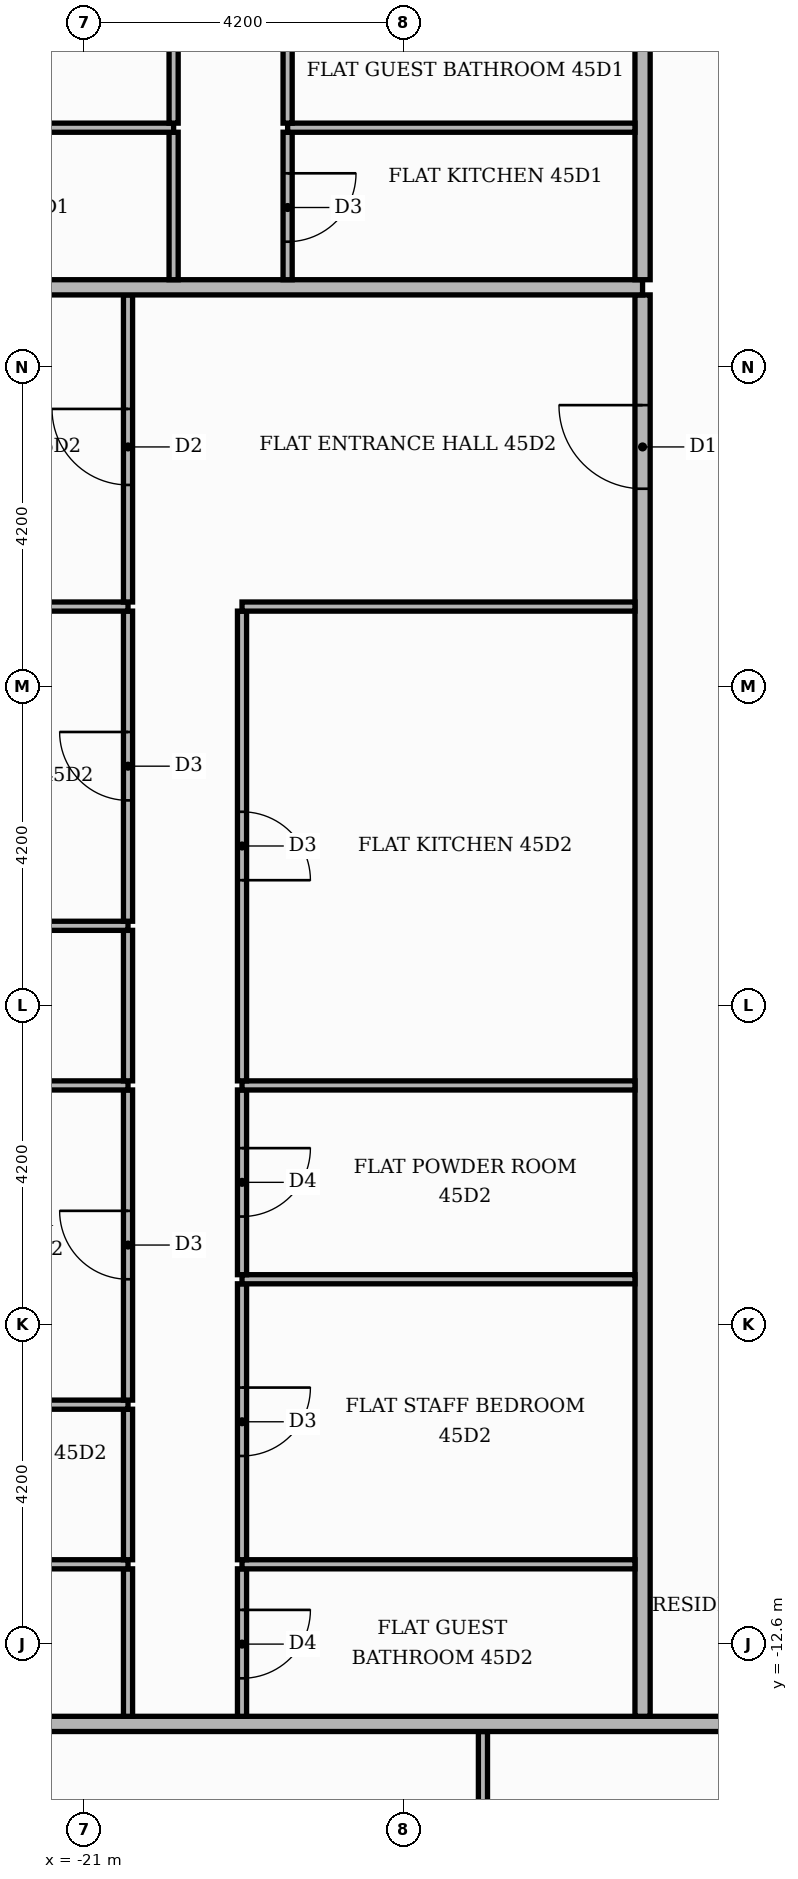
"""IFC4 building model, lengths in metres.
Left out: names, types, materials, properties, quantities, classifications, styles, units other than length and angle.
Written with IfcOpenShell. Run it as: python <this file> out.ifc"""

import sys

from ifc_helpers import new_model, si_unit, direction, frame, frame_2d, origin, place, context, subcontext, project, spatial, rectangle, extrude, element, fill, save


model = new_model("IFC4")
c1 = context("Model", 3, precision=1e-05, world=origin(), true_north=direction((0.0, 1.0)))
c2 = subcontext(c1, "Body", "Model", "MODEL_VIEW")
j1 = project(units=[si_unit("LENGTHUNIT", "METRE"), si_unit("PLANEANGLEUNIT", "RADIAN")], contexts=[c1])
p1 = place(None, origin())
s1 = spatial("IfcSite", under=j1, at=p1, CompositionType="ELEMENT")
p2 = place(p1, origin())
s2 = spatial("IfcBuilding", under=s1, at=p2, CompositionType="ELEMENT")
p3 = place(p2, frame((0.0, 0.0, 192.3)))
s3 = spatial("IfcBuildingStorey", under=s2, at=p3, CompositionType="ELEMENT", Elevation=192.3)
p4 = place(p3, frame((-15.75, -20.36, 0.0), z_axis=(0.0, 0.0, 1.0), x_axis=(0.0, 1.0, 0.0)))
e1 = element("IfcWall", 1, at=p4, inside=s3, PredefinedType="PARTITIONING", context=c2, shape_type="SweptSolid", body=[
    extrude(rectangle(XDim=6.61, YDim=0.12, at=frame_2d((3.305, 0.0))), origin(), (0.0, 0.0, 1.0), 3.48),
])
p5 = place(p4, frame((2.825, 0.0, 0.0)))
e2 = element("IfcOpeningElement", 2, at=p5, cuts=e1, PredefinedType="OPENING", context=c2, shape_type="SweptSolid", body=[
    extrude(rectangle(XDim=1.0, YDim=2.1, at=frame_2d((0.5, 1.05))), frame((0.0, 0.07, 0.0), z_axis=(0.0, -1.0, 0.0), x_axis=(1.0, 0.0, 0.0)), (0.0, 0.0, 1.0), 0.14),
])
p6 = place(p3, frame((-25.42, -13.65, 0.0), z_axis=(0.0, 0.0, 1.0), x_axis=(1.0, 0.0, 0.0)))
e3 = element("IfcWall", 3, at=p6, inside=s3, PredefinedType="PARTITIONING", context=c2, shape_type="SweptSolid", body=[
    extrude(rectangle(XDim=39.07, YDim=0.2, at=frame_2d((19.535, 0.0))), origin(), (0.0, 0.0, 1.0), 3.48),
])
p7 = place(p6, frame((13.32, 0.0, 0.0)))
e4 = element("IfcOpeningElement", 4, at=p7, cuts=e3, PredefinedType="OPENING", context=c2, shape_type="SweptSolid", body=[
    extrude(rectangle(XDim=1.1, YDim=2.4, at=frame_2d((0.55, 1.2))), frame((0.0, 0.11, 0.0), z_axis=(0.0, -1.0, 0.0), x_axis=(1.0, 0.0, 0.0)), (0.0, 0.0, 1.0), 0.22),
])
p8 = place(p6, frame((25.92, 0.0, 0.0)))
e5 = element("IfcOpeningElement", 5, at=p8, cuts=e3, PredefinedType="OPENING", context=c2, shape_type="SweptSolid", body=[
    extrude(rectangle(XDim=1.1, YDim=2.4, at=frame_2d((0.55, 1.2))), frame((0.0, 0.11, 0.0), z_axis=(0.0, -1.0, 0.0), x_axis=(1.0, 0.0, 0.0)), (0.0, 0.0, 1.0), 0.22),
])
p9 = place(p3, frame((-20.42, -13.55, 0.0), z_axis=(0.0, 0.0, 1.0), x_axis=(0.0, 1.0, 0.0)))
e6 = element("IfcWall", 6, at=p9, inside=s3, PredefinedType="PARTITIONING", context=c2, shape_type="SweptSolid", body=[
    extrude(rectangle(XDim=1.94, YDim=0.12, at=frame_2d((0.97, 0.0))), origin(), (0.0, 0.0, 1.0), 3.48),
])
p10 = place(p3, frame((-18.92, -13.55, 0.0), z_axis=(0.0, 0.0, 1.0), x_axis=(0.0, 1.0, 0.0)))
e7 = element("IfcWall", 7, at=p10, inside=s3, PredefinedType="PARTITIONING", context=c2, shape_type="SweptSolid", body=[
    extrude(rectangle(XDim=1.94, YDim=0.12, at=frame_2d((0.97, 0.0))), origin(), (0.0, 0.0, 1.0), 3.48),
])
p11 = place(p10, frame((0.5, 0.0, 0.0)))
e8 = element("IfcOpeningElement", 8, at=p11, cuts=e7, PredefinedType="OPENING", context=c2, shape_type="SweptSolid", body=[
    extrude(rectangle(XDim=0.9, YDim=2.1, at=frame_2d((0.45, 1.05))), frame((0.0, 0.07, 0.0), z_axis=(0.0, -1.0, 0.0), x_axis=(1.0, 0.0, 0.0)), (0.0, 0.0, 1.0), 0.14),
])
p12 = place(p3, frame((-13.65, -13.55, 0.0), z_axis=(0.0, 0.0, 1.0), x_axis=(0.0, 1.0, 0.0)))
e9 = element("IfcWall", 9, at=p12, inside=s3, PredefinedType="PARTITIONING", context=c2, shape_type="SweptSolid", body=[
    extrude(rectangle(XDim=18.7, YDim=0.2, at=frame_2d((9.35, 0.0))), origin(), (0.0, 0.0, 1.0), 3.48),
])
p13 = place(p12, frame((16.15, 0.0, 0.0)))
e10 = element("IfcOpeningElement", 10, at=p13, cuts=e9, PredefinedType="OPENING", context=c2, shape_type="SweptSolid", body=[
    extrude(rectangle(XDim=1.1, YDim=2.4, at=frame_2d((0.55, 1.2))), frame((0.0, 0.11, 0.0), z_axis=(0.0, -1.0, 0.0), x_axis=(1.0, 0.0, 0.0)), (0.0, 0.0, 1.0), 0.22),
])
p14 = place(p3, frame((-25.42, -11.55, 0.0), z_axis=(0.0, 0.0, 1.0), x_axis=(1.0, 0.0, 0.0)))
e11 = element("IfcWall", 11, at=p14, inside=s3, PredefinedType="PARTITIONING", context=c2, shape_type="SweptSolid", body=[
    extrude(rectangle(XDim=5.0, YDim=0.12, at=frame_2d((2.5, 0.0))), origin(), (0.0, 0.0, 1.0), 3.48),
])
p15 = place(p14, frame((1.9, 0.0, 0.0)))
e12 = element("IfcOpeningElement", 12, at=p15, cuts=e11, PredefinedType="OPENING", context=c2, shape_type="SweptSolid", body=[
    extrude(rectangle(XDim=0.9, YDim=2.1, at=frame_2d((0.45, 1.05))), frame((0.0, 0.07, 0.0), z_axis=(0.0, -1.0, 0.0), x_axis=(1.0, 0.0, 0.0)), (0.0, 0.0, 1.0), 0.14),
])
p16 = place(p3, frame((-18.92, -11.55, 0.0), z_axis=(0.0, 0.0, 1.0), x_axis=(1.0, 0.0, 0.0)))
e13 = element("IfcWall", 13, at=p16, inside=s3, PredefinedType="PARTITIONING", context=c2, shape_type="SweptSolid", body=[
    extrude(rectangle(XDim=5.17, YDim=0.12, at=frame_2d((2.585, 0.0))), origin(), (0.0, 0.0, 1.0), 3.48),
])
p17 = place(p3, frame((-20.42, -11.49, 0.0), z_axis=(0.0, 0.0, 1.0), x_axis=(0.0, 1.0, 0.0)))
e14 = element("IfcWall", 14, at=p17, inside=s3, PredefinedType="PARTITIONING", context=c2, shape_type="SweptSolid", body=[
    extrude(rectangle(XDim=1.98, YDim=0.12, at=frame_2d((0.99, 0.0))), origin(), (0.0, 0.0, 1.0), 3.48),
])
p18 = place(p3, frame((-18.92, -11.49, 0.0), z_axis=(0.0, 0.0, 1.0), x_axis=(0.0, 1.0, 0.0)))
e15 = element("IfcWall", 15, at=p18, inside=s3, PredefinedType="PARTITIONING", context=c2, shape_type="SweptSolid", body=[
    extrude(rectangle(XDim=3.63, YDim=0.12, at=frame_2d((1.815, 0.0))), origin(), (0.0, 0.0, 1.0), 3.48),
])
p19 = place(p18, frame((1.365, 0.0, 0.0)))
e16 = element("IfcOpeningElement", 16, at=p19, cuts=e15, PredefinedType="OPENING", context=c2, shape_type="SweptSolid", body=[
    extrude(rectangle(XDim=0.9, YDim=2.1, at=frame_2d((0.45, 1.05))), frame((0.0, 0.07, 0.0), z_axis=(0.0, -1.0, 0.0), x_axis=(1.0, 0.0, 0.0)), (0.0, 0.0, 1.0), 0.14),
])
p20 = place(p3, frame((-25.42, -9.45, 0.0), z_axis=(0.0, 0.0, 1.0), x_axis=(1.0, 0.0, 0.0)))
e17 = element("IfcWall", 17, at=p20, inside=s3, PredefinedType="PARTITIONING", context=c2, shape_type="SweptSolid", body=[
    extrude(rectangle(XDim=5.0, YDim=0.12, at=frame_2d((2.5, 0.0))), origin(), (0.0, 0.0, 1.0), 3.48),
])
p21 = place(p20, frame((1.9, 0.0, 0.0)))
e18 = element("IfcOpeningElement", 18, at=p21, cuts=e17, PredefinedType="OPENING", context=c2, shape_type="SweptSolid", body=[
    extrude(rectangle(XDim=0.9, YDim=2.1, at=frame_2d((0.45, 1.05))), frame((0.0, 0.07, 0.0), z_axis=(0.0, -1.0, 0.0), x_axis=(1.0, 0.0, 0.0)), (0.0, 0.0, 1.0), 0.14),
])
p22 = place(p3, frame((-20.42, -9.39, 0.0), z_axis=(0.0, 0.0, 1.0), x_axis=(0.0, 1.0, 0.0)))
e19 = element("IfcWall", 19, at=p22, inside=s3, PredefinedType="PARTITIONING", context=c2, shape_type="SweptSolid", body=[
    extrude(rectangle(XDim=4.08, YDim=0.12, at=frame_2d((2.04, 0.0))), origin(), (0.0, 0.0, 1.0), 3.48),
])
p23 = place(p22, frame((1.59, 0.0, 0.0)))
e20 = element("IfcOpeningElement", 20, at=p23, cuts=e19, PredefinedType="OPENING", context=c2, shape_type="SweptSolid", body=[
    extrude(rectangle(XDim=0.9, YDim=2.1, at=frame_2d((0.45, 1.05))), frame((0.0, 0.07, 0.0), z_axis=(0.0, -1.0, 0.0), x_axis=(1.0, 0.0, 0.0)), (0.0, 0.0, 1.0), 0.14),
])
p24 = place(p3, frame((-18.92, -7.8, 0.0), z_axis=(0.0, 0.0, 1.0), x_axis=(1.0, 0.0, 0.0)))
e21 = element("IfcWall", 21, at=p24, inside=s3, PredefinedType="PARTITIONING", context=c2, shape_type="SweptSolid", body=[
    extrude(rectangle(XDim=5.17, YDim=0.12, at=frame_2d((2.585, 0.0))), origin(), (0.0, 0.0, 1.0), 3.48),
])
p25 = place(p3, frame((-18.92, -7.74, 0.0), z_axis=(0.0, 0.0, 1.0), x_axis=(0.0, 1.0, 0.0)))
e22 = element("IfcWall", 22, at=p25, inside=s3, PredefinedType="PARTITIONING", context=c2, shape_type="SweptSolid", body=[
    extrude(rectangle(XDim=2.43, YDim=0.12, at=frame_2d((1.215, 0.0))), origin(), (0.0, 0.0, 1.0), 3.48),
])
p26 = place(p25, frame((0.765, 0.0, 0.0)))
e23 = element("IfcOpeningElement", 23, at=p26, cuts=e22, PredefinedType="OPENING", context=c2, shape_type="SweptSolid", body=[
    extrude(rectangle(XDim=0.9, YDim=2.1, at=frame_2d((0.45, 1.05))), frame((0.0, 0.07, 0.0), z_axis=(0.0, -1.0, 0.0), x_axis=(1.0, 0.0, 0.0)), (0.0, 0.0, 1.0), 0.14),
])
p27 = place(p3, frame((-25.42, -5.25, 0.0), z_axis=(0.0, 0.0, 1.0), x_axis=(1.0, 0.0, 0.0)))
e24 = element("IfcWall", 24, at=p27, inside=s3, PredefinedType="PARTITIONING", context=c2, shape_type="SweptSolid", body=[
    extrude(rectangle(XDim=5.0, YDim=0.12, at=frame_2d((2.5, 0.0))), origin(), (0.0, 0.0, 1.0), 3.48),
])
p28 = place(p3, frame((-18.92, -5.25, 0.0), z_axis=(0.0, 0.0, 1.0), x_axis=(1.0, 0.0, 0.0)))
e25 = element("IfcWall", 25, at=p28, inside=s3, PredefinedType="PARTITIONING", context=c2, shape_type="SweptSolid", body=[
    extrude(rectangle(XDim=5.17, YDim=0.12, at=frame_2d((2.585, 0.0))), origin(), (0.0, 0.0, 1.0), 3.48),
])
p29 = place(p3, frame((-20.42, -5.19, 0.0), z_axis=(0.0, 0.0, 1.0), x_axis=(0.0, 1.0, 0.0)))
e26 = element("IfcWall", 26, at=p29, inside=s3, PredefinedType="PARTITIONING", context=c2, shape_type="SweptSolid", body=[
    extrude(rectangle(XDim=1.98, YDim=0.12, at=frame_2d((0.99, 0.0))), origin(), (0.0, 0.0, 1.0), 3.48),
])
p30 = place(p3, frame((-18.92, -5.19, 0.0), z_axis=(0.0, 0.0, 1.0), x_axis=(0.0, 1.0, 0.0)))
e27 = element("IfcWall", 27, at=p30, inside=s3, PredefinedType="PARTITIONING", context=c2, shape_type="SweptSolid", body=[
    extrude(rectangle(XDim=6.18, YDim=0.12, at=frame_2d((3.09, 0.0))), origin(), (0.0, 0.0, 1.0), 3.48),
])
p31 = place(p30, frame((2.64, 0.0, 0.0)))
e28 = element("IfcOpeningElement", 28, at=p31, cuts=e27, PredefinedType="OPENING", context=c2, shape_type="SweptSolid", body=[
    extrude(rectangle(XDim=0.9, YDim=2.1, at=frame_2d((0.45, 1.05))), frame((0.0, 0.07, 0.0), z_axis=(0.0, -1.0, 0.0), x_axis=(1.0, 0.0, 0.0)), (0.0, 0.0, 1.0), 0.14),
])
p32 = place(p3, frame((-25.42, -3.15, 0.0), z_axis=(0.0, 0.0, 1.0), x_axis=(1.0, 0.0, 0.0)))
e29 = element("IfcWall", 29, at=p32, inside=s3, PredefinedType="PARTITIONING", context=c2, shape_type="SweptSolid", body=[
    extrude(rectangle(XDim=5.0, YDim=0.12, at=frame_2d((2.5, 0.0))), origin(), (0.0, 0.0, 1.0), 3.48),
])
p33 = place(p32, frame((1.9, 0.0, 0.0)))
e30 = element("IfcOpeningElement", 30, at=p33, cuts=e29, PredefinedType="OPENING", context=c2, shape_type="SweptSolid", body=[
    extrude(rectangle(XDim=0.9, YDim=2.1, at=frame_2d((0.45, 1.05))), frame((0.0, 0.07, 0.0), z_axis=(0.0, -1.0, 0.0), x_axis=(1.0, 0.0, 0.0)), (0.0, 0.0, 1.0), 0.14),
])
p34 = place(p3, frame((-20.42, -3.09, 0.0), z_axis=(0.0, 0.0, 1.0), x_axis=(0.0, 1.0, 0.0)))
e31 = element("IfcWall", 31, at=p34, inside=s3, PredefinedType="PARTITIONING", context=c2, shape_type="SweptSolid", body=[
    extrude(rectangle(XDim=4.08, YDim=0.12, at=frame_2d((2.04, 0.0))), origin(), (0.0, 0.0, 1.0), 3.48),
])
p35 = place(p34, frame((1.59, 0.0, 0.0)))
e32 = element("IfcOpeningElement", 32, at=p35, cuts=e31, PredefinedType="OPENING", context=c2, shape_type="SweptSolid", body=[
    extrude(rectangle(XDim=0.9, YDim=2.1, at=frame_2d((0.45, 1.05))), frame((0.0, 0.07, 0.0), z_axis=(0.0, -1.0, 0.0), x_axis=(1.0, 0.0, 0.0)), (0.0, 0.0, 1.0), 0.14),
])
p36 = place(p3, frame((-25.42, 1.05, 0.0), z_axis=(0.0, 0.0, 1.0), x_axis=(1.0, 0.0, 0.0)))
e33 = element("IfcWall", 33, at=p36, inside=s3, PredefinedType="PARTITIONING", context=c2, shape_type="SweptSolid", body=[
    extrude(rectangle(XDim=5.0, YDim=0.12, at=frame_2d((2.5, 0.0))), origin(), (0.0, 0.0, 1.0), 3.48),
])
p37 = place(p3, frame((-18.92, 1.05, 0.0), z_axis=(0.0, 0.0, 1.0), x_axis=(1.0, 0.0, 0.0)))
e34 = element("IfcWall", 34, at=p37, inside=s3, PredefinedType="PARTITIONING", context=c2, shape_type="SweptSolid", body=[
    extrude(rectangle(XDim=5.17, YDim=0.12, at=frame_2d((2.585, 0.0))), origin(), (0.0, 0.0, 1.0), 3.48),
])
p38 = place(p3, frame((-20.42, 1.11, 0.0), z_axis=(0.0, 0.0, 1.0), x_axis=(0.0, 1.0, 0.0)))
e35 = element("IfcWall", 35, at=p38, inside=s3, PredefinedType="PARTITIONING", context=c2, shape_type="SweptSolid", body=[
    extrude(rectangle(XDim=4.04, YDim=0.12, at=frame_2d((2.02, 0.0))), origin(), (0.0, 0.0, 1.0), 3.48),
])
p39 = place(p38, frame((1.54, 0.0, 0.0)))
e36 = element("IfcOpeningElement", 36, at=p39, cuts=e35, PredefinedType="OPENING", context=c2, shape_type="SweptSolid", body=[
    extrude(rectangle(XDim=1.0, YDim=2.1, at=frame_2d((0.5, 1.05))), frame((0.0, 0.07, 0.0), z_axis=(0.0, -1.0, 0.0), x_axis=(1.0, 0.0, 0.0)), (0.0, 0.0, 1.0), 0.14),
])
p40 = place(p3, frame((-25.42, 5.25, 0.0), z_axis=(0.0, 0.0, 1.0), x_axis=(1.0, 0.0, 0.0)))
e37 = element("IfcWall", 37, at=p40, inside=s3, PredefinedType="PARTITIONING", context=c2, shape_type="SweptSolid", body=[
    extrude(rectangle(XDim=11.77, YDim=0.2, at=frame_2d((5.885, 0.0))), origin(), (0.0, 0.0, 1.0), 3.48),
])
p41 = place(p3, frame((-19.82, 5.35, 0.0), z_axis=(0.0, 0.0, 1.0), x_axis=(0.0, 1.0, 0.0)))
e38 = element("IfcWall", 38, at=p41, inside=s3, PredefinedType="PARTITIONING", context=c2, shape_type="SweptSolid", body=[
    extrude(rectangle(XDim=1.94, YDim=0.12, at=frame_2d((0.97, 0.0))), origin(), (0.0, 0.0, 1.0), 3.48),
])
p42 = place(p3, frame((-18.32, 5.35, 0.0), z_axis=(0.0, 0.0, 1.0), x_axis=(0.0, 1.0, 0.0)))
e39 = element("IfcWall", 39, at=p42, inside=s3, PredefinedType="PARTITIONING", context=c2, shape_type="SweptSolid", body=[
    extrude(rectangle(XDim=1.94, YDim=0.12, at=frame_2d((0.97, 0.0))), origin(), (0.0, 0.0, 1.0), 3.48),
])
p43 = place(p42, frame((0.5, 0.0, 0.0)))
e40 = element("IfcOpeningElement", 40, at=p43, cuts=e39, PredefinedType="OPENING", context=c2, shape_type="SweptSolid", body=[
    extrude(rectangle(XDim=0.9, YDim=2.1, at=frame_2d((0.45, 1.05))), frame((0.0, 0.07, 0.0), z_axis=(0.0, -1.0, 0.0), x_axis=(1.0, 0.0, 0.0)), (0.0, 0.0, 1.0), 0.14),
])
p44 = place(p3, frame((-13.65, 5.35, 0.0), z_axis=(0.0, 0.0, 1.0), x_axis=(0.0, 1.0, 0.0)))
e41 = element("IfcWall", 41, at=p44, inside=s3, PredefinedType="PARTITIONING", context=c2, shape_type="SweptSolid", body=[
    extrude(rectangle(XDim=8.2, YDim=0.2, at=frame_2d((4.1, 0.0))), origin(), (0.0, 0.0, 1.0), 3.48),
])
p45 = place(p44, frame((5.65, 0.0, 0.0)))
e42 = element("IfcOpeningElement", 42, at=p45, cuts=e41, PredefinedType="OPENING", context=c2, shape_type="SweptSolid", body=[
    extrude(rectangle(XDim=1.1, YDim=2.4, at=frame_2d((0.55, 1.2))), frame((0.0, 0.11, 0.0), z_axis=(0.0, -1.0, 0.0), x_axis=(1.0, 0.0, 0.0)), (0.0, 0.0, 1.0), 0.22),
])
p46 = place(p3, frame((-25.42, 7.35, 0.0), z_axis=(0.0, 0.0, 1.0), x_axis=(1.0, 0.0, 0.0)))
e43 = element("IfcWall", 43, at=p46, inside=s3, PredefinedType="PARTITIONING", context=c2, shape_type="SweptSolid", body=[
    extrude(rectangle(XDim=5.6, YDim=0.12, at=frame_2d((2.8, 0.0))), origin(), (0.0, 0.0, 1.0), 3.48),
])
p47 = place(p46, frame((2.2, 0.0, 0.0)))
e44 = element("IfcOpeningElement", 44, at=p47, cuts=e43, PredefinedType="OPENING", context=c2, shape_type="SweptSolid", body=[
    extrude(rectangle(XDim=0.9, YDim=2.1, at=frame_2d((0.45, 1.05))), frame((0.0, 0.07, 0.0), z_axis=(0.0, -1.0, 0.0), x_axis=(1.0, 0.0, 0.0)), (0.0, 0.0, 1.0), 0.14),
])
p48 = place(p3, frame((-18.32, 7.35, 0.0), z_axis=(0.0, 0.0, 1.0), x_axis=(1.0, 0.0, 0.0)))
e45 = element("IfcWall", 45, at=p48, inside=s3, PredefinedType="PARTITIONING", context=c2, shape_type="SweptSolid", body=[
    extrude(rectangle(XDim=4.57, YDim=0.12, at=frame_2d((2.285, 0.0))), origin(), (0.0, 0.0, 1.0), 3.48),
])
for number, where, z_axis, x_axis in (
    (46, (-19.82, 7.41, 0.0), (0.0, 0.0, 1.0), (0.0, 1.0, 0.0)),
    (47, (-18.32, 7.41, 0.0), (0.0, 0.0, 1.0), (0.0, 1.0, 0.0)),
):
    element("IfcWall", number, at=place(p3, frame(where, z_axis=z_axis, x_axis=x_axis)), inside=s3, PredefinedType="PARTITIONING", context=c2, shape_type="SweptSolid", body=[
        extrude(rectangle(XDim=1.98, YDim=0.12, at=frame_2d((0.99, 0.0))), origin(), (0.0, 0.0, 1.0), 3.48),
    ])
p49 = place(p43, frame((0.9, 0.0, 0.0), z_axis=(0.0, 0.0, 1.0), x_axis=(-1.0, 0.0, 0.0)))
e48 = element("IfcDoor", 48, at=p49, inside=s3, OperationType="SINGLE_SWING_RIGHT", PredefinedType="DOOR", context=c2, shape_type="SweptSolid", body=[
    extrude(rectangle(XDim=0.9, YDim=2.1, at=frame_2d((0.45, 1.05))), frame((0.0, 0.025, 0.0), z_axis=(0.0, -1.0, 0.0), x_axis=(1.0, 0.0, 0.0)), (0.0, 0.0, 1.0), 0.05),
])
fill(e40, e48)
p50 = place(p13, origin())
e49 = element("IfcDoor", 49, at=p50, inside=s3, OperationType="SINGLE_SWING_RIGHT", PredefinedType="DOOR", context=c2, shape_type="SweptSolid", body=[
    extrude(rectangle(XDim=1.1, YDim=2.4, at=frame_2d((0.55, 1.2))), frame((0.0, 0.025, 0.0), z_axis=(0.0, -1.0, 0.0), x_axis=(1.0, 0.0, 0.0)), (0.0, 0.0, 1.0), 0.05),
])
fill(e10, e49)
p51 = place(p31, frame((0.9, 0.0, 0.0), z_axis=(0.0, 0.0, 1.0), x_axis=(-1.0, 0.0, 0.0)))
e50 = element("IfcDoor", 50, at=p51, inside=s3, OperationType="SINGLE_SWING_LEFT", PredefinedType="DOOR", context=c2, shape_type="SweptSolid", body=[
    extrude(rectangle(XDim=0.9, YDim=2.1, at=frame_2d((0.45, 1.05))), frame((0.0, 0.025, 0.0), z_axis=(0.0, -1.0, 0.0), x_axis=(1.0, 0.0, 0.0)), (0.0, 0.0, 1.0), 0.05),
])
fill(e28, e50)
p52 = place(p26, frame((0.9, 0.0, 0.0), z_axis=(0.0, 0.0, 1.0), x_axis=(-1.0, 0.0, 0.0)))
e51 = element("IfcDoor", 51, at=p52, inside=s3, OperationType="SINGLE_SWING_RIGHT", PredefinedType="DOOR", context=c2, shape_type="SweptSolid", body=[
    extrude(rectangle(XDim=0.9, YDim=2.1, at=frame_2d((0.45, 1.05))), frame((0.0, 0.025, 0.0), z_axis=(0.0, -1.0, 0.0), x_axis=(1.0, 0.0, 0.0)), (0.0, 0.0, 1.0), 0.05),
])
fill(e23, e51)
p53 = place(p19, frame((0.9, 0.0, 0.0), z_axis=(0.0, 0.0, 1.0), x_axis=(-1.0, 0.0, 0.0)))
e52 = element("IfcDoor", 52, at=p53, inside=s3, OperationType="SINGLE_SWING_RIGHT", PredefinedType="DOOR", context=c2, shape_type="SweptSolid", body=[
    extrude(rectangle(XDim=0.9, YDim=2.1, at=frame_2d((0.45, 1.05))), frame((0.0, 0.025, 0.0), z_axis=(0.0, -1.0, 0.0), x_axis=(1.0, 0.0, 0.0)), (0.0, 0.0, 1.0), 0.05),
])
fill(e16, e52)
p54 = place(p11, frame((0.9, 0.0, 0.0), z_axis=(0.0, 0.0, 1.0), x_axis=(-1.0, 0.0, 0.0)))
e53 = element("IfcDoor", 53, at=p54, inside=s3, OperationType="SINGLE_SWING_RIGHT", PredefinedType="DOOR", context=c2, shape_type="SweptSolid", body=[
    extrude(rectangle(XDim=0.9, YDim=2.1, at=frame_2d((0.45, 1.05))), frame((0.0, 0.025, 0.0), z_axis=(0.0, -1.0, 0.0), x_axis=(1.0, 0.0, 0.0)), (0.0, 0.0, 1.0), 0.05),
])
fill(e8, e53)
p55 = place(p39, origin())
e54 = element("IfcDoor", 54, at=p55, inside=s3, OperationType="SINGLE_SWING_RIGHT", PredefinedType="DOOR", context=c2, shape_type="SweptSolid", body=[
    extrude(rectangle(XDim=1.0, YDim=2.1, at=frame_2d((0.5, 1.05))), frame((0.0, 0.025, 0.0), z_axis=(0.0, -1.0, 0.0), x_axis=(1.0, 0.0, 0.0)), (0.0, 0.0, 1.0), 0.05),
])
fill(e36, e54)
p56 = place(p35, origin())
e55 = element("IfcDoor", 55, at=p56, inside=s3, OperationType="SINGLE_SWING_RIGHT", PredefinedType="DOOR", context=c2, shape_type="SweptSolid", body=[
    extrude(rectangle(XDim=0.9, YDim=2.1, at=frame_2d((0.45, 1.05))), frame((0.0, 0.025, 0.0), z_axis=(0.0, -1.0, 0.0), x_axis=(1.0, 0.0, 0.0)), (0.0, 0.0, 1.0), 0.05),
])
fill(e32, e55)
p57 = place(p23, origin())
e56 = element("IfcDoor", 56, at=p57, inside=s3, OperationType="SINGLE_SWING_RIGHT", PredefinedType="DOOR", context=c2, shape_type="SweptSolid", body=[
    extrude(rectangle(XDim=0.9, YDim=2.1, at=frame_2d((0.45, 1.05))), frame((0.0, 0.025, 0.0), z_axis=(0.0, -1.0, 0.0), x_axis=(1.0, 0.0, 0.0)), (0.0, 0.0, 1.0), 0.05),
])
fill(e20, e56)
save(model, sys.argv[1])
